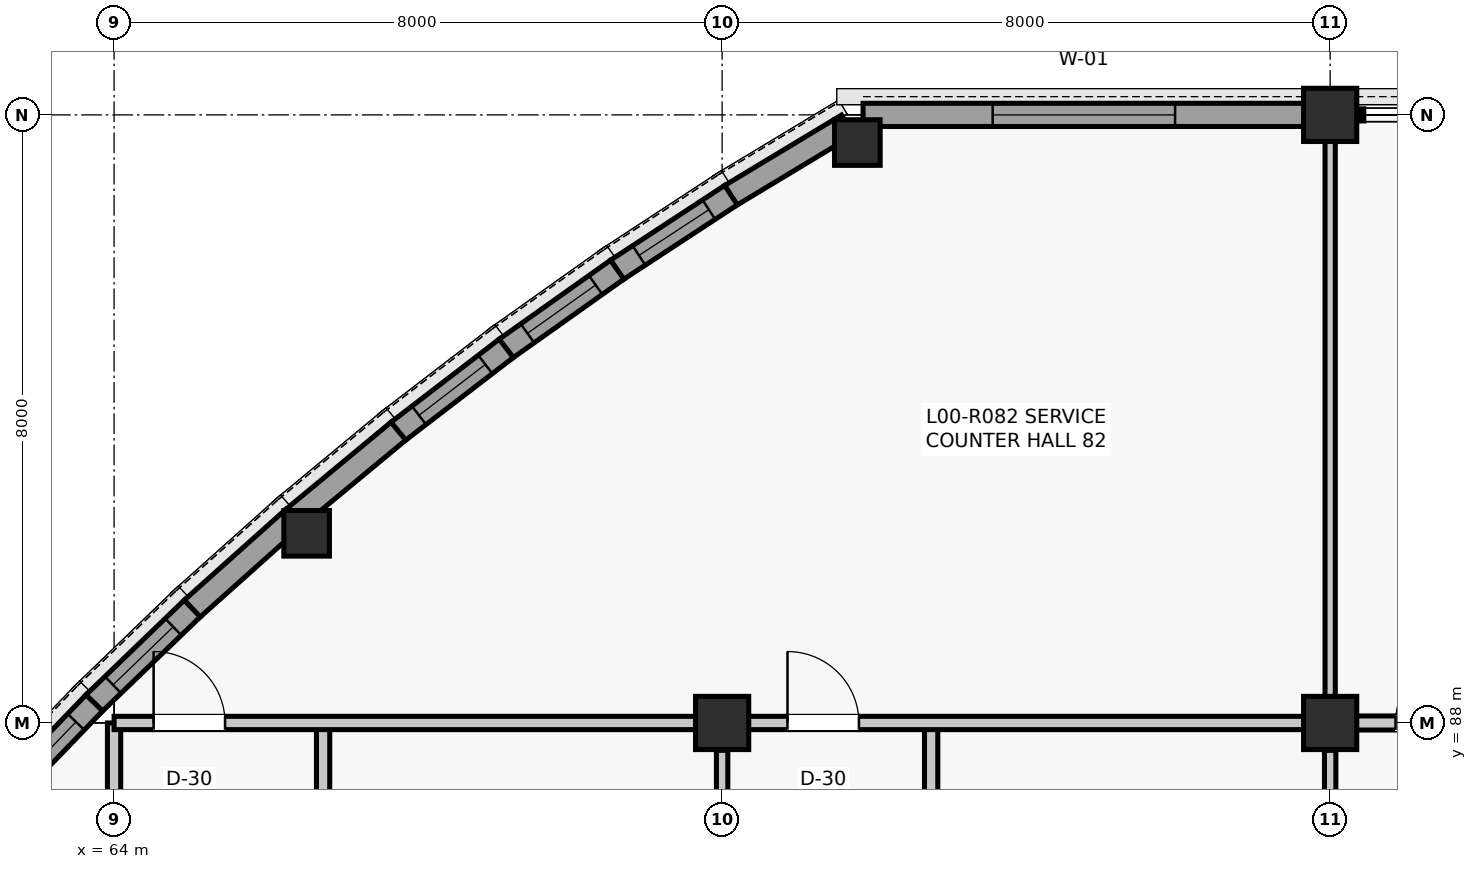
"""IFC4 building model, lengths in metres.
Left out: names, types, materials, properties, quantities, classifications, styles, units other than length and angle.
Written with IfcOpenShell. Run it as: python <this file> out.ifc"""

import sys

from ifc_helpers import new_model, si_unit, direction, frame, frame_2d, origin, origin_2d, place, context, subcontext, project, spatial, rectangle, extrude, element, fill, save


model = new_model("IFC4")
c1 = context("Model", 3, precision=1e-05, world=origin(), true_north=direction((0.0, 1.0)))
c2 = subcontext(c1, "Body", "Model", "MODEL_VIEW")
j1 = project(units=[si_unit("LENGTHUNIT", "METRE"), si_unit("PLANEANGLEUNIT", "RADIAN")], contexts=[c1])
p1 = place(None, origin())
s1 = spatial("IfcSite", under=j1, at=p1, CompositionType="ELEMENT")
p2 = place(p1, origin())
s2 = spatial("IfcBuilding", under=s1, at=p2, CompositionType="ELEMENT")
p3 = place(p2, origin())
s3 = spatial("IfcBuildingStorey", under=s2, at=p3, CompositionType="ELEMENT", Elevation=0.0)
for number, where, z_axis, x_axis in (
    (1, (72.0, 88.0, 0.0), (0.0, 0.0, 1.0), (1.0, 0.0, 0.0)),
    (2, (80.0, 88.0, 0.0), (0.0, 0.0, 1.0), (1.0, 0.0, 0.0)),
    (3, (80.0, 96.0, 0.0), (0.0, 0.0, 1.0), (1.0, 0.0, 0.0)),
):
    element("IfcColumn", number, at=place(p3, frame(where, z_axis=z_axis, x_axis=x_axis)), inside=s3, PredefinedType="COLUMN", context=c2, shape_type="SweptSolid", body=[
        extrude(rectangle(XDim=0.7, YDim=0.7, at=origin_2d()), origin(), (0.0, 0.0, 1.0), 5.28),
    ])
for number, where, z_axis, x_axis in (
    (4, (73.779, 95.636, 0.0), (0.0, 0.0, 1.0), (1.0, 0.0, 0.0)),
    (5, (66.533, 90.495, 0.0), (0.0, 0.0, 1.0), (1.0, 0.0, 0.0)),
):
    element("IfcColumn", number, at=place(p3, frame(where, z_axis=z_axis, x_axis=x_axis)), inside=s3, PredefinedType="COLUMN", context=c2, shape_type="SweptSolid", body=[
        extrude(rectangle(XDim=0.6, YDim=0.6, at=origin_2d()), origin(), (0.0, 0.0, 1.0), 5.28),
    ])
p4 = place(p3, frame((73.649, 95.867, 0.0), z_axis=(0.0, 0.0, 1.0), x_axis=(-0.856543302071, -0.51607516088, 0.0)))
e6 = element("IfcWall", 6, at=p4, inside=s3, PredefinedType="SOLIDWALL", context=c2, shape_type="SweptSolid", body=[
    extrude(rectangle(XDim=1.795, YDim=0.305, at=frame_2d((0.897, 0.0))), origin(), (0.0, 0.0, 1.0), 5.035),
])
p5 = place(p3, frame((72.117, 94.944, 0.0), z_axis=(0.0, 0.0, 1.0), x_axis=(-0.836686786408, -0.547681678944, 0.0)))
e7 = element("IfcWall", 7, at=p5, inside=s3, PredefinedType="SOLIDWALL", context=c2, shape_type="SweptSolid", body=[
    extrude(rectangle(XDim=1.795, YDim=0.305, at=frame_2d((0.897, 0.0))), origin(), (0.0, 0.0, 1.0), 5.035),
])
p6 = place(p5, frame((0.347, 0.0, 0.9)))
e8 = element("IfcOpeningElement", 8, at=p6, cuts=e7, PredefinedType="OPENING", context=c2, shape_type="SweptSolid", body=[
    extrude(rectangle(XDim=1.1, YDim=2.1, at=frame_2d((0.55, 1.05))), frame((0.0, 0.162, 0.0), z_axis=(0.0, -1.0, 0.0), x_axis=(1.0, 0.0, 0.0)), (0.0, 0.0, 1.0), 0.325),
])
p7 = place(p3, frame((70.62, 93.964, 0.0), z_axis=(0.0, 0.0, 1.0), x_axis=(-0.815567185578, -0.578662393636, 0.0)))
e9 = element("IfcWall", 9, at=p7, inside=s3, PredefinedType="SOLIDWALL", context=c2, shape_type="SweptSolid", body=[
    extrude(rectangle(XDim=1.795, YDim=0.305, at=frame_2d((0.897, 0.0))), origin(), (0.0, 0.0, 1.0), 5.035),
])
p8 = place(p7, frame((0.348, 0.0, 0.9)))
e10 = element("IfcOpeningElement", 10, at=p8, cuts=e9, PredefinedType="OPENING", context=c2, shape_type="SweptSolid", body=[
    extrude(rectangle(XDim=1.1, YDim=2.1, at=frame_2d((0.55, 1.05))), frame((0.0, 0.162, 0.0), z_axis=(0.0, -1.0, 0.0), x_axis=(1.0, 0.0, 0.0)), (0.0, 0.0, 1.0), 0.325),
])
p9 = place(p3, frame((69.16, 92.928, 0.0), z_axis=(0.0, 0.0, 1.0), x_axis=(-0.793341406114, -0.608776981616, 0.0)))
e11 = element("IfcWall", 11, at=p9, inside=s3, PredefinedType="SOLIDWALL", context=c2, shape_type="SweptSolid", body=[
    extrude(rectangle(XDim=1.795, YDim=0.305, at=frame_2d((0.897, 0.0))), origin(), (0.0, 0.0, 1.0), 5.035),
])
p10 = place(p9, frame((0.347, 0.0, 0.9)))
e12 = element("IfcOpeningElement", 12, at=p10, cuts=e11, PredefinedType="OPENING", context=c2, shape_type="SweptSolid", body=[
    extrude(rectangle(XDim=1.1, YDim=2.1, at=frame_2d((0.55, 1.05))), frame((0.0, 0.162, 0.0), z_axis=(0.0, -1.0, 0.0), x_axis=(1.0, 0.0, 0.0)), (0.0, 0.0, 1.0), 0.325),
])
p11 = place(p3, frame((67.74, 91.839, 0.0), z_axis=(0.0, 0.0, 1.0), x_axis=(-0.769991012207, -0.638054732073, 0.0)))
e13 = element("IfcWall", 13, at=p11, inside=s3, PredefinedType="SOLIDWALL", context=c2, shape_type="SweptSolid", body=[
    extrude(rectangle(XDim=1.795, YDim=0.305, at=frame_2d((0.897, 0.0))), origin(), (0.0, 0.0, 1.0), 5.035),
])
p12 = place(p3, frame((66.363, 90.698, 0.0), z_axis=(0.0, 0.0, 1.0), x_axis=(-0.745703543965, -0.666277888361, 0.0)))
e14 = element("IfcWall", 14, at=p12, inside=s3, PredefinedType="SOLIDWALL", context=c2, shape_type="SweptSolid", body=[
    extrude(rectangle(XDim=1.795, YDim=0.305, at=frame_2d((0.897, 0.0))), origin(), (0.0, 0.0, 1.0), 5.035),
])
p13 = place(p3, frame((65.029, 89.506, 0.0), z_axis=(0.0, 0.0, 1.0), x_axis=(-0.720242191926, -0.693722700342, 0.0)))
e15 = element("IfcWall", 15, at=p13, inside=s3, PredefinedType="SOLIDWALL", context=c2, shape_type="SweptSolid", body=[
    extrude(rectangle(XDim=1.795, YDim=0.305, at=frame_2d((0.897, 0.0))), origin(), (0.0, 0.0, 1.0), 5.035),
])
p14 = place(p13, frame((0.347, 0.0, 0.9)))
e16 = element("IfcOpeningElement", 16, at=p14, cuts=e15, PredefinedType="OPENING", context=c2, shape_type="SweptSolid", body=[
    extrude(rectangle(XDim=1.1, YDim=2.1, at=frame_2d((0.55, 1.05))), frame((0.0, 0.162, 0.0), z_axis=(0.0, -1.0, 0.0), x_axis=(1.0, 0.0, 0.0)), (0.0, 0.0, 1.0), 0.325),
])
p15 = place(p3, frame((63.74, 88.264, 0.0), z_axis=(0.0, 0.0, 1.0), x_axis=(-0.693722700342, -0.720242191926, 0.0)))
e17 = element("IfcWall", 17, at=p15, inside=s3, PredefinedType="SOLIDWALL", context=c2, shape_type="SweptSolid", body=[
    extrude(rectangle(XDim=1.795, YDim=0.305, at=frame_2d((0.897, 0.0))), origin(), (0.0, 0.0, 1.0), 5.035),
])
p16 = place(p15, frame((0.347, 0.0, 0.9)))
e18 = element("IfcOpeningElement", 18, at=p16, cuts=e17, PredefinedType="OPENING", context=c2, shape_type="SweptSolid", body=[
    extrude(rectangle(XDim=1.1, YDim=2.1, at=frame_2d((0.55, 1.05))), frame((0.0, 0.162, 0.0), z_axis=(0.0, -1.0, 0.0), x_axis=(1.0, 0.0, 0.0)), (0.0, 0.0, 1.0), 0.325),
])
p17 = place(p3, frame((73.854, 96.0, 0.0), z_axis=(0.0, 0.0, 1.0), x_axis=(1.0, 0.0, 0.0)))
e19 = element("IfcWall", 19, at=p17, inside=s3, PredefinedType="SOLIDWALL", context=c2, shape_type="SweptSolid", body=[
    extrude(rectangle(XDim=5.811, YDim=0.305, at=frame_2d((2.905, 0.0))), origin(), (0.0, 0.0, 1.0), 5.035),
])
p18 = place(p17, frame((1.705, 0.0, 0.9)))
e20 = element("IfcOpeningElement", 20, at=p18, cuts=e19, PredefinedType="OPENING", context=c2, shape_type="SweptSolid", body=[
    extrude(rectangle(XDim=2.4, YDim=2.8, at=frame_2d((1.2, 1.4))), frame((0.0, 0.162, 0.0), z_axis=(0.0, -1.0, 0.0), x_axis=(1.0, 0.0, 0.0)), (0.0, 0.0, 1.0), 0.325),
])
p19 = place(p3, frame((66.75, 82.7, 0.0), z_axis=(0.0, 0.0, 1.0), x_axis=(0.0, 1.0, 0.0)))
e21 = element("IfcWall", 21, at=p19, inside=s3, PredefinedType="PARTITIONING", context=c2, shape_type="SweptSolid", body=[
    extrude(rectangle(XDim=5.28, YDim=0.175, at=frame_2d((2.64, 0.0))), origin(), (0.0, 0.0, 1.0), 5.025),
])
p20 = place(p3, frame((72.0, 82.75, 0.0), z_axis=(0.0, 0.0, 1.0), x_axis=(0.0, 1.0, 0.0)))
e22 = element("IfcWall", 22, at=p20, inside=s3, PredefinedType="PARTITIONING", context=c2, shape_type="SweptSolid", body=[
    extrude(rectangle(XDim=4.89, YDim=0.15, at=frame_2d((2.445, 0.0))), origin(), (0.0, 0.0, 1.0), 4.471),
])
p21 = place(p3, frame((74.75, 82.7, 0.0), z_axis=(0.0, 0.0, 1.0), x_axis=(0.0, 1.0, 0.0)))
e23 = element("IfcWall", 23, at=p21, inside=s3, PredefinedType="PARTITIONING", context=c2, shape_type="SweptSolid", body=[
    extrude(rectangle(XDim=5.28, YDim=0.175, at=frame_2d((2.64, 0.0))), origin(), (0.0, 0.0, 1.0), 4.327),
])
p22 = place(p3, frame((80.0, 82.75, 0.0), z_axis=(0.0, 0.0, 1.0), x_axis=(0.0, 1.0, 0.0)))
e24 = element("IfcWall", 24, at=p22, inside=s3, PredefinedType="PARTITIONING", context=c2, shape_type="SweptSolid", body=[
    extrude(rectangle(XDim=4.89, YDim=0.15, at=frame_2d((2.445, 0.0))), origin(), (0.0, 0.0, 1.0), 4.403),
])
p23 = place(p3, frame((64.0, 80.34, 0.0), z_axis=(0.0, 0.0, 1.0), x_axis=(0.0, 1.0, 0.0)))
e25 = element("IfcWall", 25, at=p23, inside=s3, PredefinedType="PARTITIONING", context=c2, shape_type="SweptSolid", body=[
    extrude(rectangle(XDim=7.66, YDim=0.175, at=frame_2d((3.83, 0.0))), origin(), (0.0, 0.0, 1.0), 5.025),
])
p24 = place(p23, frame((3.305, 0.0, 0.0)))
e26 = element("IfcOpeningElement", 26, at=p24, cuts=e25, PredefinedType="OPENING", context=c2, shape_type="SweptSolid", body=[
    extrude(rectangle(XDim=1.05, YDim=2.15, at=frame_2d((0.525, 1.075))), frame((0.0, 0.097, 0.0), z_axis=(0.0, -1.0, 0.0), x_axis=(1.0, 0.0, 0.0)), (0.0, 0.0, 1.0), 0.195),
])
p25 = place(p3, frame((64.0, 88.0, 0.0), z_axis=(0.0, 0.0, 1.0), x_axis=(1.0, 0.0, 0.0)))
e27 = element("IfcWall", 27, at=p25, inside=s3, PredefinedType="PARTITIONING", context=c2, shape_type="SweptSolid", body=[
    extrude(rectangle(XDim=7.66, YDim=0.175, at=frame_2d((3.83, 0.0))), origin(), (0.0, 0.0, 1.0), 5.025),
])
p26 = place(p25, frame((0.52, 0.0, 0.0)))
e28 = element("IfcOpeningElement", 28, at=p26, cuts=e27, PredefinedType="OPENING", context=c2, shape_type="SweptSolid", body=[
    extrude(rectangle(XDim=0.94, YDim=2.12, at=frame_2d((0.47, 1.06))), frame((0.0, 0.097, 0.0), z_axis=(0.0, -1.0, 0.0), x_axis=(1.0, 0.0, 0.0)), (0.0, 0.0, 1.0), 0.195),
])
p27 = place(p3, frame((72.34, 88.0, 0.0), z_axis=(0.0, 0.0, 1.0), x_axis=(1.0, 0.0, 0.0)))
e29 = element("IfcWall", 29, at=p27, inside=s3, PredefinedType="PARTITIONING", context=c2, shape_type="SweptSolid", body=[
    extrude(rectangle(XDim=7.32, YDim=0.175, at=frame_2d((3.66, 0.0))), origin(), (0.0, 0.0, 1.0), 4.327),
])
p28 = place(p27, frame((0.52, 0.0, 0.0)))
e30 = element("IfcOpeningElement", 30, at=p28, cuts=e29, PredefinedType="OPENING", context=c2, shape_type="SweptSolid", body=[
    extrude(rectangle(XDim=0.94, YDim=2.12, at=frame_2d((0.47, 1.06))), frame((0.0, 0.097, 0.0), z_axis=(0.0, -1.0, 0.0), x_axis=(1.0, 0.0, 0.0)), (0.0, 0.0, 1.0), 0.195),
])
p29 = place(p3, frame((80.0, 88.34, 0.0), z_axis=(0.0, 0.0, 1.0), x_axis=(0.0, 1.0, 0.0)))
e31 = element("IfcWall", 31, at=p29, inside=s3, PredefinedType="PARTITIONING", context=c2, shape_type="SweptSolid", body=[
    extrude(rectangle(XDim=7.32, YDim=0.135, at=frame_2d((3.66, 0.0))), origin(), (0.0, 0.0, 1.0), 4.412),
])
p30 = place(p3, frame((80.34, 88.0, 0.0), z_axis=(0.0, 0.0, 1.0), x_axis=(1.0, 0.0, 0.0)))
e32 = element("IfcWall", 32, at=p30, inside=s3, PredefinedType="PARTITIONING", context=c2, shape_type="SweptSolid", body=[
    extrude(rectangle(XDim=7.32, YDim=0.185, at=frame_2d((3.66, 0.0))), origin(), (0.0, 0.0, 1.0), 4.403),
])
p31 = place(p30, frame((0.52, 0.0, 0.0)))
e33 = element("IfcOpeningElement", 33, at=p31, cuts=e32, PredefinedType="OPENING", context=c2, shape_type="SweptSolid", body=[
    extrude(rectangle(XDim=0.94, YDim=2.12, at=frame_2d((0.47, 1.06))), frame((0.0, 0.103, 0.0), z_axis=(0.0, -1.0, 0.0), x_axis=(1.0, 0.0, 0.0)), (0.0, 0.0, 1.0), 0.205),
])
p32 = place(p6, origin())
e34 = element("IfcWindow", 34, at=p32, inside=s3, PartitioningType="SINGLE_PANEL", PredefinedType="WINDOW", context=c2, shape_type="SweptSolid", body=[
    extrude(rectangle(XDim=1.1, YDim=2.1, at=frame_2d((0.55, 1.05))), frame((0.0, 0.03, 0.0), z_axis=(0.0, -1.0, 0.0), x_axis=(1.0, 0.0, 0.0)), (0.0, 0.0, 1.0), 0.06),
])
fill(e8, e34)
p33 = place(p8, origin())
e35 = element("IfcWindow", 35, at=p33, inside=s3, PartitioningType="SINGLE_PANEL", PredefinedType="WINDOW", context=c2, shape_type="SweptSolid", body=[
    extrude(rectangle(XDim=1.1, YDim=2.1, at=frame_2d((0.55, 1.05))), frame((0.0, 0.03, 0.0), z_axis=(0.0, -1.0, 0.0), x_axis=(1.0, 0.0, 0.0)), (0.0, 0.0, 1.0), 0.06),
])
fill(e10, e35)
p34 = place(p10, origin())
e36 = element("IfcWindow", 36, at=p34, inside=s3, PartitioningType="SINGLE_PANEL", PredefinedType="WINDOW", context=c2, shape_type="SweptSolid", body=[
    extrude(rectangle(XDim=1.1, YDim=2.1, at=frame_2d((0.55, 1.05))), frame((0.0, 0.03, 0.0), z_axis=(0.0, -1.0, 0.0), x_axis=(1.0, 0.0, 0.0)), (0.0, 0.0, 1.0), 0.06),
])
fill(e12, e36)
p35 = place(p14, origin())
e37 = element("IfcWindow", 37, at=p35, inside=s3, PartitioningType="SINGLE_PANEL", PredefinedType="WINDOW", context=c2, shape_type="SweptSolid", body=[
    extrude(rectangle(XDim=1.1, YDim=2.1, at=frame_2d((0.55, 1.05))), frame((0.0, 0.03, 0.0), z_axis=(0.0, -1.0, 0.0), x_axis=(1.0, 0.0, 0.0)), (0.0, 0.0, 1.0), 0.06),
])
fill(e16, e37)
p36 = place(p16, origin())
e38 = element("IfcWindow", 38, at=p36, inside=s3, PartitioningType="SINGLE_PANEL", PredefinedType="WINDOW", context=c2, shape_type="SweptSolid", body=[
    extrude(rectangle(XDim=1.1, YDim=2.1, at=frame_2d((0.55, 1.05))), frame((0.0, 0.03, 0.0), z_axis=(0.0, -1.0, 0.0), x_axis=(1.0, 0.0, 0.0)), (0.0, 0.0, 1.0), 0.06),
])
fill(e18, e38)
p37 = place(p18, origin())
e39 = element("IfcWindow", 39, at=p37, inside=s3, PartitioningType="SINGLE_PANEL", PredefinedType="WINDOW", context=c2, shape_type="SweptSolid", body=[
    extrude(rectangle(XDim=2.4, YDim=2.8, at=frame_2d((1.2, 1.4))), frame((0.0, 0.03, 0.0), z_axis=(0.0, -1.0, 0.0), x_axis=(1.0, 0.0, 0.0)), (0.0, 0.0, 1.0), 0.06),
])
fill(e20, e39)
p38 = place(p26, origin())
e40 = element("IfcDoor", 40, at=p38, inside=s3, OperationType="SINGLE_SWING_LEFT", PredefinedType="DOOR", context=c2, shape_type="SweptSolid", body=[
    extrude(rectangle(XDim=0.94, YDim=2.12, at=frame_2d((0.47, 1.06))), frame((0.0, 0.025, 0.0), z_axis=(0.0, -1.0, 0.0), x_axis=(1.0, 0.0, 0.0)), (0.0, 0.0, 1.0), 0.05),
])
fill(e28, e40)
p39 = place(p28, origin())
e41 = element("IfcDoor", 41, at=p39, inside=s3, OperationType="SINGLE_SWING_LEFT", PredefinedType="DOOR", context=c2, shape_type="SweptSolid", body=[
    extrude(rectangle(XDim=0.94, YDim=2.12, at=frame_2d((0.47, 1.06))), frame((0.0, 0.025, 0.0), z_axis=(0.0, -1.0, 0.0), x_axis=(1.0, 0.0, 0.0)), (0.0, 0.0, 1.0), 0.05),
])
fill(e30, e41)
p40 = place(p31, origin())
e42 = element("IfcDoor", 42, at=p40, inside=s3, OperationType="SINGLE_SWING_RIGHT", PredefinedType="DOOR", context=c2, shape_type="SweptSolid", body=[
    extrude(rectangle(XDim=0.94, YDim=2.12, at=frame_2d((0.47, 1.06))), frame((0.0, 0.025, 0.0), z_axis=(0.0, -1.0, 0.0), x_axis=(1.0, 0.0, 0.0)), (0.0, 0.0, 1.0), 0.05),
])
fill(e33, e42)
save(model, sys.argv[1])
